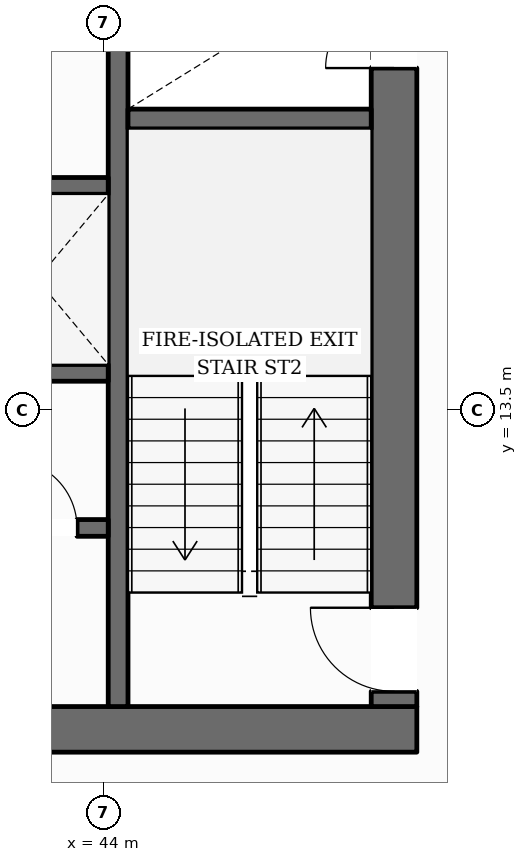
"""IFC4 building model, lengths in metres.
Left out: names, types, materials, properties, quantities, classifications, styles, units other than length and angle.
Written with IfcOpenShell. Run it as: python <this file> out.ifc"""

import sys

from ifc_helpers import new_model, si_unit, direction, frame, frame_2d, origin, place, context, subcontext, project, spatial, rectangle, extrude, element, fill, save


model = new_model("IFC4")
c1 = context("Model", 3, precision=1e-05, world=origin(), true_north=direction((0.0, 1.0)))
c2 = subcontext(c1, "Body", "Model", "MODEL_VIEW")
j1 = project(units=[si_unit("LENGTHUNIT", "METRE"), si_unit("PLANEANGLEUNIT", "RADIAN")], contexts=[c1])
p1 = place(None, origin())
s1 = spatial("IfcSite", under=j1, at=p1, CompositionType="ELEMENT")
p2 = place(p1, origin())
s2 = spatial("IfcBuilding", under=s1, at=p2, CompositionType="ELEMENT")
p3 = place(p2, frame((0.0, 0.0, 59.9)))
s3 = spatial("IfcBuildingStorey", under=s2, at=p3, CompositionType="ELEMENT", Elevation=59.9)
p4 = place(p3, frame((27.88, 9.3, 0.0), z_axis=(0.0, 0.0, 1.0), x_axis=(1.0, 0.0, 0.0)))
e1 = element("IfcWall", 1, at=p4, inside=s3, PredefinedType="SOLIDWALL", context=c2, shape_type="SweptSolid", body=[
    extrude(rectangle(XDim=20.24, YDim=0.6, at=frame_2d((10.12, 0.0))), origin(), (0.0, 0.0, 1.0), 3.59),
])
p5 = place(p4, frame((10.62, 0.0, 0.0)))
e2 = element("IfcOpeningElement", 2, at=p5, cuts=e1, PredefinedType="OPENING", context=c2, shape_type="SweptSolid", body=[
    extrude(rectangle(XDim=1.4, YDim=2.2, at=frame_2d((0.7, 1.1))), frame((0.0, 0.31, 0.0), z_axis=(0.0, -1.0, 0.0), x_axis=(1.0, 0.0, 0.0)), (0.0, 0.0, 1.0), 0.62),
])
p6 = place(p3, frame((47.82, 9.6, 0.0), z_axis=(0.0, 0.0, 1.0), x_axis=(0.0, 1.0, 0.0)))
e3 = element("IfcWall", 3, at=p6, inside=s3, PredefinedType="SOLIDWALL", context=c2, shape_type="SweptSolid", body=[
    extrude(rectangle(XDim=13.0, YDim=0.6, at=frame_2d((6.5, 0.0))), origin(), (0.0, 0.0, 1.0), 3.59),
])
p7 = place(p6, frame((0.2, 0.0, 0.0)))
e4 = element("IfcOpeningElement", 4, at=p7, cuts=e3, PredefinedType="OPENING", context=c2, shape_type="SweptSolid", body=[
    extrude(rectangle(XDim=1.1, YDim=2.15, at=frame_2d((0.55, 1.075))), frame((0.0, 0.31, 0.0), z_axis=(0.0, -1.0, 0.0), x_axis=(1.0, 0.0, 0.0)), (0.0, 0.0, 1.0), 0.62),
])
p8 = place(p6, frame((8.4, 0.0, 0.0)))
e5 = element("IfcOpeningElement", 5, at=p8, cuts=e3, PredefinedType="OPENING", context=c2, shape_type="SweptSolid", body=[
    extrude(rectangle(XDim=0.9, YDim=2.1, at=frame_2d((0.45, 1.05))), frame((0.0, 0.31, 0.0), z_axis=(0.0, -1.0, 0.0), x_axis=(1.0, 0.0, 0.0)), (0.0, 0.0, 1.0), 0.62),
])
p9 = place(p3, frame((44.19, 9.6, 0.0), z_axis=(0.0, 0.0, 1.0), x_axis=(0.0, 1.0, 0.0)))
e6 = element("IfcWall", 6, at=p9, inside=s3, PredefinedType="SHEAR", context=c2, shape_type="SweptSolid", body=[
    extrude(rectangle(XDim=13.0, YDim=0.26, at=frame_2d((6.5, 0.0))), origin(), (0.0, 0.0, 1.0), 3.59),
])
p10 = place(p9, frame((10.925, 0.0, 0.0)))
e7 = element("IfcOpeningElement", 7, at=p10, cuts=e6, PredefinedType="OPENING", context=c2, shape_type="SweptSolid", body=[
    extrude(rectangle(XDim=1.25, YDim=2.25, at=frame_2d((0.625, 1.125))), frame((0.0, 0.14, 0.0), z_axis=(0.0, -1.0, 0.0), x_axis=(1.0, 0.0, 0.0)), (0.0, 0.0, 1.0), 0.28),
])
p11 = place(p3, frame((44.32, 17.33, 0.0), z_axis=(0.0, 0.0, 1.0), x_axis=(1.0, 0.0, 0.0)))
e8 = element("IfcWall", 8, at=p11, inside=s3, PredefinedType="SHEAR", context=c2, shape_type="SweptSolid", body=[
    extrude(rectangle(XDim=3.2, YDim=0.26, at=frame_2d((1.6, 0.0))), origin(), (0.0, 0.0, 1.0), 3.59),
])
p12 = place(p3, frame((31.94, 16.45, 0.0), z_axis=(0.0, 0.0, 1.0), x_axis=(1.0, 0.0, 0.0)))
e9 = element("IfcWall", 9, at=p12, inside=s3, PredefinedType="SOLIDWALL", context=c2, shape_type="SweptSolid", body=[
    extrude(rectangle(XDim=12.12, YDim=0.22, at=frame_2d((6.06, 0.0))), origin(), (0.0, 0.0, 1.0), 3.59),
])
p13 = place(p3, frame((31.94, 13.99, 0.0), z_axis=(0.0, 0.0, 1.0), x_axis=(1.0, 0.0, 0.0)))
e10 = element("IfcWall", 10, at=p13, inside=s3, PredefinedType="SOLIDWALL", context=c2, shape_type="SweptSolid", body=[
    extrude(rectangle(XDim=12.12, YDim=0.22, at=frame_2d((6.06, 0.0))), origin(), (0.0, 0.0, 1.0), 3.59),
])
p14 = place(p13, frame((0.385, 0.0, 0.0)))
e11 = element("IfcOpeningElement", 11, at=p14, cuts=e10, PredefinedType="OPENING", context=c2, shape_type="SweptSolid", body=[
    extrude(rectangle(XDim=1.1, YDim=2.2, at=frame_2d((0.55, 1.1))), frame((0.0, 0.12, 0.0), z_axis=(0.0, -1.0, 0.0), x_axis=(1.0, 0.0, 0.0)), (0.0, 0.0, 1.0), 0.24),
])
p15 = place(p13, frame((2.435, 0.0, 0.0)))
e12 = element("IfcOpeningElement", 12, at=p15, cuts=e10, PredefinedType="OPENING", context=c2, shape_type="SweptSolid", body=[
    extrude(rectangle(XDim=1.1, YDim=2.2, at=frame_2d((0.55, 1.1))), frame((0.0, 0.12, 0.0), z_axis=(0.0, -1.0, 0.0), x_axis=(1.0, 0.0, 0.0)), (0.0, 0.0, 1.0), 0.24),
])
p16 = place(p13, frame((4.485, 0.0, 0.0)))
e13 = element("IfcOpeningElement", 13, at=p16, cuts=e10, PredefinedType="OPENING", context=c2, shape_type="SweptSolid", body=[
    extrude(rectangle(XDim=1.1, YDim=2.2, at=frame_2d((0.55, 1.1))), frame((0.0, 0.12, 0.0), z_axis=(0.0, -1.0, 0.0), x_axis=(1.0, 0.0, 0.0)), (0.0, 0.0, 1.0), 0.24),
])
p17 = place(p3, frame((40.28, 11.95, 0.0), z_axis=(0.0, 0.0, 1.0), x_axis=(1.0, 0.0, 0.0)))
e14 = element("IfcWall", 14, at=p17, inside=s3, PredefinedType="SOLIDWALL", context=c2, shape_type="SweptSolid", body=[
    extrude(rectangle(XDim=3.78, YDim=0.22, at=frame_2d((1.89, 0.0))), origin(), (0.0, 0.0, 1.0), 3.59),
])
p18 = place(p17, frame((0.62, 0.0, 0.0)))
e15 = element("IfcOpeningElement", 15, at=p18, cuts=e14, PredefinedType="OPENING", context=c2, shape_type="SweptSolid", body=[
    extrude(rectangle(XDim=0.9, YDim=2.1, at=frame_2d((0.45, 1.05))), frame((0.0, 0.12, 0.0), z_axis=(0.0, -1.0, 0.0), x_axis=(1.0, 0.0, 0.0)), (0.0, 0.0, 1.0), 0.24),
])
p19 = place(p17, frame((2.47, 0.0, 0.0)))
e16 = element("IfcOpeningElement", 16, at=p19, cuts=e14, PredefinedType="OPENING", context=c2, shape_type="SweptSolid", body=[
    extrude(rectangle(XDim=0.9, YDim=2.1, at=frame_2d((0.45, 1.05))), frame((0.0, 0.12, 0.0), z_axis=(0.0, -1.0, 0.0), x_axis=(1.0, 0.0, 0.0)), (0.0, 0.0, 1.0), 0.24),
])
p20 = place(p3, frame((45.267, 44.44, 0.0), z_axis=(0.0, 0.0, 1.0), x_axis=(0.504702471056, -0.863293354376, 0.0)))
e17 = element("IfcWall", 17, at=p20, inside=s3, PredefinedType="STANDARD", context=c2, shape_type="SweptSolid", body=[
    extrude(rectangle(XDim=35.682, YDim=0.38, at=frame_2d((17.841, 0.0))), origin(), (0.0, 0.0, 1.0), 2.97),
])
p21 = place(p20, frame((31.483, 0.0, 0.65)))
e18 = element("IfcOpeningElement", 18, at=p21, cuts=e17, PredefinedType="OPENING", context=c2, shape_type="SweptSolid", body=[
    extrude(rectangle(XDim=1.65, YDim=1.75, at=frame_2d((0.825, 0.875))), frame((0.0, 0.2, 0.0), z_axis=(0.0, -1.0, 0.0), x_axis=(1.0, 0.0, 0.0)), (0.0, 0.0, 1.0), 0.4),
])
p22 = place(p20, frame((25.696, 0.0, 0.65)))
e19 = element("IfcOpeningElement", 19, at=p22, cuts=e17, PredefinedType="OPENING", context=c2, shape_type="SweptSolid", body=[
    extrude(rectangle(XDim=1.65, YDim=1.75, at=frame_2d((0.825, 0.875))), frame((0.0, 0.2, 0.0), z_axis=(0.0, -1.0, 0.0), x_axis=(1.0, 0.0, 0.0)), (0.0, 0.0, 1.0), 0.4),
])
p23 = place(p20, frame((14.12, 0.0, 0.65)))
e20 = element("IfcOpeningElement", 20, at=p23, cuts=e17, PredefinedType="OPENING", context=c2, shape_type="SweptSolid", body=[
    extrude(rectangle(XDim=1.65, YDim=1.75, at=frame_2d((0.825, 0.875))), frame((0.0, 0.2, 0.0), z_axis=(0.0, -1.0, 0.0), x_axis=(1.0, 0.0, 0.0)), (0.0, 0.0, 1.0), 0.4),
])
p24 = place(p20, frame((8.332, 0.0, 0.65)))
e21 = element("IfcOpeningElement", 21, at=p24, cuts=e17, PredefinedType="OPENING", context=c2, shape_type="SweptSolid", body=[
    extrude(rectangle(XDim=1.65, YDim=1.75, at=frame_2d((0.825, 0.875))), frame((0.0, 0.2, 0.0), z_axis=(0.0, -1.0, 0.0), x_axis=(1.0, 0.0, 0.0)), (0.0, 0.0, 1.0), 0.4),
])
p25 = place(p20, frame((2.544, 0.0, 0.65)))
e22 = element("IfcOpeningElement", 22, at=p25, cuts=e17, PredefinedType="OPENING", context=c2, shape_type="SweptSolid", body=[
    extrude(rectangle(XDim=1.65, YDim=1.75, at=frame_2d((0.825, 0.875))), frame((0.0, 0.2, 0.0), z_axis=(0.0, -1.0, 0.0), x_axis=(1.0, 0.0, 0.0)), (0.0, 0.0, 1.0), 0.4),
])
p26 = place(p7, origin())
e23 = element("IfcDoor", 23, at=p26, inside=s3, OperationType="SINGLE_SWING_RIGHT", PredefinedType="DOOR", context=c2, shape_type="SweptSolid", body=[
    extrude(rectangle(XDim=1.1, YDim=2.15, at=frame_2d((0.55, 1.075))), frame((0.0, 0.025, 0.0), z_axis=(0.0, -1.0, 0.0), x_axis=(1.0, 0.0, 0.0)), (0.0, 0.0, 1.0), 0.05),
])
fill(e4, e23)
p27 = place(p8, origin())
e24 = element("IfcDoor", 24, at=p27, inside=s3, OperationType="SINGLE_SWING_LEFT", PredefinedType="DOOR", context=c2, shape_type="SweptSolid", body=[
    extrude(rectangle(XDim=0.9, YDim=2.1, at=frame_2d((0.45, 1.05))), frame((0.0, 0.025, 0.0), z_axis=(0.0, -1.0, 0.0), x_axis=(1.0, 0.0, 0.0)), (0.0, 0.0, 1.0), 0.05),
])
fill(e5, e24)
p28 = place(p19, origin())
e25 = element("IfcDoor", 25, at=p28, inside=s3, OperationType="SINGLE_SWING_LEFT", PredefinedType="DOOR", context=c2, shape_type="SweptSolid", body=[
    extrude(rectangle(XDim=0.9, YDim=2.1, at=frame_2d((0.45, 1.05))), frame((0.0, 0.025, 0.0), z_axis=(0.0, -1.0, 0.0), x_axis=(1.0, 0.0, 0.0)), (0.0, 0.0, 1.0), 0.05),
])
fill(e16, e25)
save(model, sys.argv[1])
